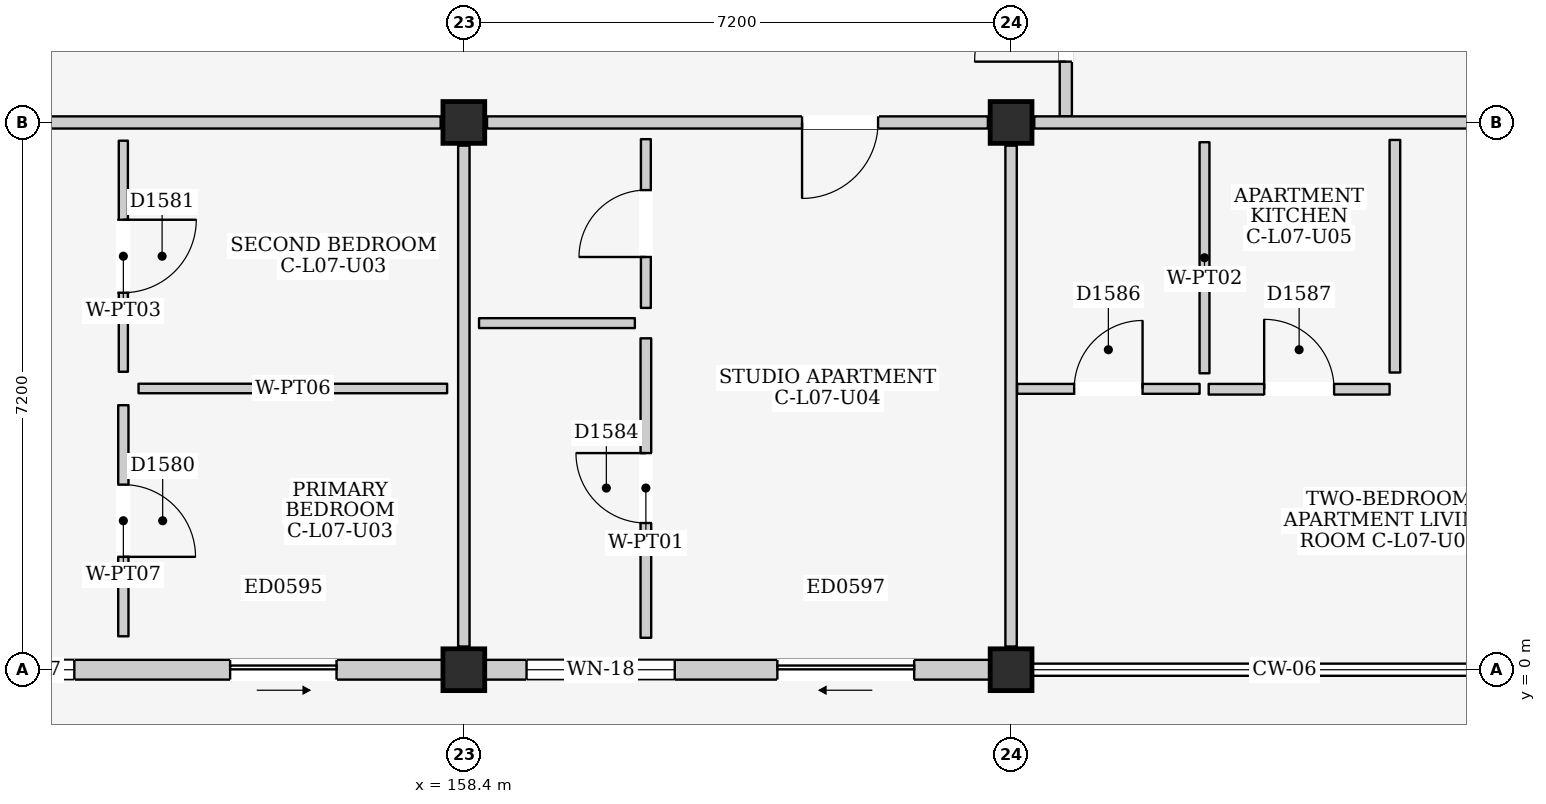
"""IFC4 building model, lengths in metres.
Left out: names, types, materials, properties, quantities, classifications, styles, units other than length and angle.
Written with IfcOpenShell. Run it as: python <this file> out.ifc"""

import sys

from ifc_helpers import new_model, si_unit, direction, frame, frame_2d, origin, origin_2d, place, context, subcontext, project, spatial, rectangle, extrude, element, fill, save


model = new_model("IFC4")
c1 = context("Model", 3, precision=1e-05, world=origin(), true_north=direction((0.0, 1.0)))
c2 = subcontext(c1, "Body", "Model", "MODEL_VIEW")
j1 = project(units=[si_unit("LENGTHUNIT", "METRE"), si_unit("PLANEANGLEUNIT", "RADIAN")], contexts=[c1])
p1 = place(None, origin())
s1 = spatial("IfcSite", under=j1, at=p1, CompositionType="ELEMENT")
p2 = place(p1, origin())
s2 = spatial("IfcBuilding", under=s1, at=p2, CompositionType="ELEMENT")
p3 = place(p2, frame((0.0, 0.0, 25.1)))
s3 = spatial("IfcBuildingStorey", under=s2, at=p3, CompositionType="ELEMENT", Elevation=25.1)
for number, where, z_axis, x_axis in (
    (1, (158.4, 0.0, 0.0), (0.0, 0.0, 1.0), (1.0, 0.0, 0.0)),
    (2, (158.4, 7.2, 0.0), (0.0, 0.0, 1.0), (1.0, 0.0, 0.0)),
    (3, (165.6, 0.0, 0.0), (0.0, 0.0, 1.0), (1.0, 0.0, 0.0)),
    (4, (165.6, 7.2, 0.0), (0.0, 0.0, 1.0), (1.0, 0.0, 0.0)),
):
    element("IfcColumn", number, at=place(p3, frame(where, z_axis=z_axis, x_axis=x_axis)), inside=s3, PredefinedType="COLUMN", context=c2, shape_type="SweptSolid", body=[
        extrude(rectangle(XDim=0.55, YDim=0.55, at=origin_2d()), origin(), (0.0, 0.0, 1.0), 3.2),
    ])
p4 = place(p3, frame((151.475, 0.0, 0.0), z_axis=(0.0, 0.0, 1.0), x_axis=(1.0, 0.0, 0.0)))
e5 = element("IfcWall", 5, at=p4, inside=s3, PredefinedType="ELEMENTEDWALL", context=c2, shape_type="SweptSolid", body=[
    extrude(rectangle(XDim=6.65, YDim=0.26, at=frame_2d((3.325, 0.0))), origin(), (0.0, 0.0, 1.0), 2.525),
])
p5 = place(p4, frame((3.85, 0.0, 0.0)))
e6 = element("IfcOpeningElement", 6, at=p5, cuts=e5, PredefinedType="OPENING", context=c2, shape_type="SweptSolid", body=[
    extrude(rectangle(XDim=1.4, YDim=2.1, at=frame_2d((0.7, 1.05))), frame((0.0, 0.145, 0.0), z_axis=(0.0, -1.0, 0.0), x_axis=(1.0, 0.0, 0.0)), (0.0, 0.0, 1.0), 0.29),
])
p6 = place(p4, frame((0.55, 0.0, 0.9)))
e7 = element("IfcOpeningElement", 7, at=p6, cuts=e5, PredefinedType="OPENING", context=c2, shape_type="SweptSolid", body=[
    extrude(rectangle(XDim=1.25, YDim=1.3, at=frame_2d((0.625, 0.65))), frame((0.0, 0.145, 0.0), z_axis=(0.0, -1.0, 0.0), x_axis=(1.0, 0.0, 0.0)), (0.0, 0.0, 1.0), 0.29),
])
p7 = place(p3, frame((158.675, 0.0, 0.0), z_axis=(0.0, 0.0, 1.0), x_axis=(1.0, 0.0, 0.0)))
e8 = element("IfcWall", 8, at=p7, inside=s3, PredefinedType="ELEMENTEDWALL", context=c2, shape_type="SweptSolid", body=[
    extrude(rectangle(XDim=6.65, YDim=0.26, at=frame_2d((3.325, 0.0))), origin(), (0.0, 0.0, 1.0), 2.525),
])
p8 = place(p7, frame((3.85, 0.0, 0.0)))
e9 = element("IfcOpeningElement", 9, at=p8, cuts=e8, PredefinedType="OPENING", context=c2, shape_type="SweptSolid", body=[
    extrude(rectangle(XDim=1.8, YDim=2.12, at=frame_2d((0.9, 1.06))), frame((0.0, 0.145, 0.0), z_axis=(0.0, -1.0, 0.0), x_axis=(1.0, 0.0, 0.0)), (0.0, 0.0, 1.0), 0.29),
])
p9 = place(p7, frame((0.55, 0.0, 0.865)))
e10 = element("IfcOpeningElement", 10, at=p9, cuts=e8, PredefinedType="OPENING", context=c2, shape_type="SweptSolid", body=[
    extrude(rectangle(XDim=1.95, YDim=1.55, at=frame_2d((0.975, 0.775))), frame((0.0, 0.145, 0.0), z_axis=(0.0, -1.0, 0.0), x_axis=(1.0, 0.0, 0.0)), (0.0, 0.0, 1.0), 0.29),
])
p10 = place(p3, frame((166.32, 7.28, 0.0), z_axis=(0.0, 0.0, 1.0), x_axis=(0.0, 1.0, 0.0)))
e11 = element("IfcWall", 11, at=p10, inside=s3, PredefinedType="PARTITIONING", context=c2, shape_type="SweptSolid", body=[
    extrude(rectangle(XDim=4.32, YDim=0.16, at=frame_2d((2.16, 0.0))), origin(), (0.0, 0.0, 1.0), 2.99),
])
p11 = place(p10, frame((0.72, 0.0, 0.0)))
e12 = element("IfcOpeningElement", 12, at=p11, cuts=e11, PredefinedType="OPENING", context=c2, shape_type="SweptSolid", body=[
    extrude(rectangle(XDim=1.2, YDim=2.2, at=frame_2d((0.6, 1.1))), frame((0.0, 0.095, 0.0), z_axis=(0.0, -1.0, 0.0), x_axis=(1.0, 0.0, 0.0)), (0.0, 0.0, 1.0), 0.19),
])
p12 = place(p3, frame((151.505, 7.2, 0.0), z_axis=(0.0, 0.0, 1.0), x_axis=(1.0, 0.0, 0.0)))
e13 = element("IfcWall", 13, at=p12, inside=s3, PredefinedType="PARTITIONING", context=c2, shape_type="SweptSolid", body=[
    extrude(rectangle(XDim=6.59, YDim=0.16, at=frame_2d((3.295, 0.0))), origin(), (0.0, 0.0, 1.0), 2.375),
])
p13 = place(p12, frame((0.18, 0.0, 0.0)))
e14 = element("IfcOpeningElement", 14, at=p13, cuts=e13, PredefinedType="OPENING", context=c2, shape_type="SweptSolid", body=[
    extrude(rectangle(XDim=1.0, YDim=2.15, at=frame_2d((0.5, 1.075))), frame((0.0, 0.095, 0.0), z_axis=(0.0, -1.0, 0.0), x_axis=(1.0, 0.0, 0.0)), (0.0, 0.0, 1.0), 0.19),
])
p14 = place(p3, frame((158.4, 0.305, 0.0), z_axis=(0.0, 0.0, 1.0), x_axis=(0.0, 1.0, 0.0)))
e15 = element("IfcWall", 15, at=p14, inside=s3, PredefinedType="PARTITIONING", context=c2, shape_type="SweptSolid", body=[
    extrude(rectangle(XDim=6.59, YDim=0.15, at=frame_2d((3.295, 0.0))), origin(), (0.0, 0.0, 1.0), 2.475),
])
p15 = place(p3, frame((153.92, 0.44, 0.0), z_axis=(0.0, 0.0, 1.0), x_axis=(0.0, 1.0, 0.0)))
e16 = element("IfcWall", 16, at=p15, inside=s3, PredefinedType="PARTITIONING", context=c2, shape_type="SweptSolid", body=[
    extrude(rectangle(XDim=3.04, YDim=0.135, at=frame_2d((1.52, 0.0))), origin(), (0.0, 0.0, 1.0), 2.99),
])
p16 = place(p15, frame((1.045, 0.0, 0.0)))
e17 = element("IfcOpeningElement", 17, at=p16, cuts=e16, PredefinedType="OPENING", context=c2, shape_type="SweptSolid", body=[
    extrude(rectangle(XDim=0.95, YDim=2.15, at=frame_2d((0.475, 1.075))), frame((0.0, 0.083, 0.0), z_axis=(0.0, -1.0, 0.0), x_axis=(1.0, 0.0, 0.0)), (0.0, 0.0, 1.0), 0.165),
])
p17 = place(p3, frame((154.12, 3.7, 0.0), z_axis=(0.0, 0.0, 1.0), x_axis=(1.0, 0.0, 0.0)))
e18 = element("IfcWall", 18, at=p17, inside=s3, PredefinedType="PARTITIONING", context=c2, shape_type="SweptSolid", body=[
    extrude(rectangle(XDim=4.06, YDim=0.125, at=frame_2d((2.03, 0.0))), origin(), (0.0, 0.0, 1.0), 2.99),
])
p18 = place(p3, frame((153.92, 3.92, 0.0), z_axis=(0.0, 0.0, 1.0), x_axis=(0.0, 1.0, 0.0)))
e19 = element("IfcWall", 19, at=p18, inside=s3, PredefinedType="PARTITIONING", context=c2, shape_type="SweptSolid", body=[
    extrude(rectangle(XDim=3.04, YDim=0.12, at=frame_2d((1.52, 0.0))), origin(), (0.0, 0.0, 1.0), 2.99),
])
p19 = place(p18, frame((1.04, 0.0, 0.0)))
e20 = element("IfcOpeningElement", 20, at=p19, cuts=e19, PredefinedType="OPENING", context=c2, shape_type="SweptSolid", body=[
    extrude(rectangle(XDim=0.96, YDim=2.15, at=frame_2d((0.48, 1.075))), frame((0.0, 0.075, 0.0), z_axis=(0.0, -1.0, 0.0), x_axis=(1.0, 0.0, 0.0)), (0.0, 0.0, 1.0), 0.15),
])
p20 = place(p3, frame((158.705, 7.2, 0.0), z_axis=(0.0, 0.0, 1.0), x_axis=(1.0, 0.0, 0.0)))
e21 = element("IfcWall", 21, at=p20, inside=s3, PredefinedType="PARTITIONING", context=c2, shape_type="SweptSolid", body=[
    extrude(rectangle(XDim=6.59, YDim=0.16, at=frame_2d((3.295, 0.0))), origin(), (0.0, 0.0, 1.0), 2.375),
])
p21 = place(p20, frame((4.145, 0.0, 0.0)))
e22 = element("IfcOpeningElement", 22, at=p21, cuts=e21, PredefinedType="OPENING", context=c2, shape_type="SweptSolid", body=[
    extrude(rectangle(XDim=1.0, YDim=2.15, at=frame_2d((0.5, 1.075))), frame((0.0, 0.095, 0.0), z_axis=(0.0, -1.0, 0.0), x_axis=(1.0, 0.0, 0.0)), (0.0, 0.0, 1.0), 0.19),
])
p22 = place(p3, frame((165.6, 0.305, 0.0), z_axis=(0.0, 0.0, 1.0), x_axis=(0.0, 1.0, 0.0)))
e23 = element("IfcWall", 23, at=p22, inside=s3, PredefinedType="PARTITIONING", context=c2, shape_type="SweptSolid", body=[
    extrude(rectangle(XDim=6.59, YDim=0.15, at=frame_2d((3.295, 0.0))), origin(), (0.0, 0.0, 1.0), 2.475),
])
p23 = place(p3, frame((158.6, 4.56, 0.0), z_axis=(0.0, 0.0, 1.0), x_axis=(1.0, 0.0, 0.0)))
e24 = element("IfcWall", 24, at=p23, inside=s3, PredefinedType="PARTITIONING", context=c2, shape_type="SweptSolid", body=[
    extrude(rectangle(XDim=2.05, YDim=0.13, at=frame_2d((1.025, 0.0))), origin(), (0.0, 0.0, 1.0), 2.99),
])
p24 = place(p3, frame((160.795, 4.76, 0.0), z_axis=(0.0, 0.0, 1.0), x_axis=(0.0, 1.0, 0.0)))
e25 = element("IfcWall", 25, at=p24, inside=s3, PredefinedType="PARTITIONING", context=c2, shape_type="SweptSolid", body=[
    extrude(rectangle(XDim=2.22, YDim=0.13, at=frame_2d((1.11, 0.0))), origin(), (0.0, 0.0, 1.0), 2.99),
])
p25 = place(p24, frame((0.67, 0.0, 0.0)))
e26 = element("IfcOpeningElement", 26, at=p25, cuts=e25, PredefinedType="OPENING", context=c2, shape_type="SweptSolid", body=[
    extrude(rectangle(XDim=0.88, YDim=2.1, at=frame_2d((0.44, 1.05))), frame((0.0, 0.08, 0.0), z_axis=(0.0, -1.0, 0.0), x_axis=(1.0, 0.0, 0.0)), (0.0, 0.0, 1.0), 0.16),
])
p26 = place(p3, frame((160.795, 0.42, 0.0), z_axis=(0.0, 0.0, 1.0), x_axis=(0.0, 1.0, 0.0)))
e27 = element("IfcWall", 27, at=p26, inside=s3, PredefinedType="PARTITIONING", context=c2, shape_type="SweptSolid", body=[
    extrude(rectangle(XDim=3.94, YDim=0.14, at=frame_2d((1.97, 0.0))), origin(), (0.0, 0.0, 1.0), 2.99),
])
p27 = place(p26, frame((1.51, 0.0, 0.0)))
e28 = element("IfcOpeningElement", 28, at=p27, cuts=e27, PredefinedType="OPENING", context=c2, shape_type="SweptSolid", body=[
    extrude(rectangle(XDim=0.92, YDim=2.1, at=frame_2d((0.46, 1.05))), frame((0.0, 0.085, 0.0), z_axis=(0.0, -1.0, 0.0), x_axis=(1.0, 0.0, 0.0)), (0.0, 0.0, 1.0), 0.17),
])
p28 = place(p3, frame((165.905, 7.2, 0.0), z_axis=(0.0, 0.0, 1.0), x_axis=(1.0, 0.0, 0.0)))
e29 = element("IfcWall", 29, at=p28, inside=s3, PredefinedType="PARTITIONING", context=c2, shape_type="SweptSolid", body=[
    extrude(rectangle(XDim=6.59, YDim=0.16, at=frame_2d((3.295, 0.0))), origin(), (0.0, 0.0, 1.0), 2.375),
])
p29 = place(p3, frame((165.68, 3.695, 0.0), z_axis=(0.0, 0.0, 1.0), x_axis=(1.0, 0.0, 0.0)))
e30 = element("IfcWall", 30, at=p29, inside=s3, PredefinedType="PARTITIONING", context=c2, shape_type="SweptSolid", body=[
    extrude(rectangle(XDim=2.4, YDim=0.13, at=frame_2d((1.2, 0.0))), origin(), (0.0, 0.0, 1.0), 2.99),
])
p30 = place(p29, frame((0.75, 0.0, 0.0)))
e31 = element("IfcOpeningElement", 31, at=p30, cuts=e30, PredefinedType="OPENING", context=c2, shape_type="SweptSolid", body=[
    extrude(rectangle(XDim=0.9, YDim=2.1, at=frame_2d((0.45, 1.05))), frame((0.0, 0.08, 0.0), z_axis=(0.0, -1.0, 0.0), x_axis=(1.0, 0.0, 0.0)), (0.0, 0.0, 1.0), 0.16),
])
p31 = place(p3, frame((168.145, 3.9, 0.0), z_axis=(0.0, 0.0, 1.0), x_axis=(0.0, 1.0, 0.0)))
e32 = element("IfcWall", 32, at=p31, inside=s3, PredefinedType="PARTITIONING", context=c2, shape_type="SweptSolid", body=[
    extrude(rectangle(XDim=3.04, YDim=0.13, at=frame_2d((1.52, 0.0))), origin(), (0.0, 0.0, 1.0), 2.99),
])
p32 = place(p3, frame((168.2, 3.69, 0.0), z_axis=(0.0, 0.0, 1.0), x_axis=(1.0, 0.0, 0.0)))
e33 = element("IfcWall", 33, at=p32, inside=s3, PredefinedType="PARTITIONING", context=c2, shape_type="SweptSolid", body=[
    extrude(rectangle(XDim=2.38, YDim=0.14, at=frame_2d((1.19, 0.0))), origin(), (0.0, 0.0, 1.0), 2.99),
])
p33 = place(p32, frame((0.73, 0.0, 0.0)))
e34 = element("IfcOpeningElement", 34, at=p33, cuts=e33, PredefinedType="OPENING", context=c2, shape_type="SweptSolid", body=[
    extrude(rectangle(XDim=0.92, YDim=2.1, at=frame_2d((0.46, 1.05))), frame((0.0, 0.085, 0.0), z_axis=(0.0, -1.0, 0.0), x_axis=(1.0, 0.0, 0.0)), (0.0, 0.0, 1.0), 0.17),
])
p34 = place(p3, frame((170.65, 3.91, 0.0), z_axis=(0.0, 0.0, 1.0), x_axis=(0.0, 1.0, 0.0)))
e35 = element("IfcWall", 35, at=p34, inside=s3, PredefinedType="PARTITIONING", context=c2, shape_type="SweptSolid", body=[
    extrude(rectangle(XDim=3.06, YDim=0.14, at=frame_2d((1.53, 0.0))), origin(), (0.0, 0.0, 1.0), 2.99),
])
p35 = place(p5, frame((1.4, 0.0, 0.0), z_axis=(0.0, 0.0, 1.0), x_axis=(-1.0, 0.0, 0.0)))
e36 = element("IfcDoor", 36, at=p35, inside=s3, OperationType="SLIDING_TO_RIGHT", PredefinedType="DOOR", context=c2, shape_type="SweptSolid", body=[
    extrude(rectangle(XDim=1.4, YDim=2.1, at=frame_2d((0.7, 1.05))), frame((0.0, 0.025, 0.0), z_axis=(0.0, -1.0, 0.0), x_axis=(1.0, 0.0, 0.0)), (0.0, 0.0, 1.0), 0.05),
])
fill(e6, e36)
p36 = place(p6, origin())
e37 = element("IfcWindow", 37, at=p36, inside=s3, PartitioningType="SINGLE_PANEL", PredefinedType="WINDOW", context=c2, shape_type="SweptSolid", body=[
    extrude(rectangle(XDim=1.25, YDim=1.3, at=frame_2d((0.625, 0.65))), frame((0.0, 0.03, 0.0), z_axis=(0.0, -1.0, 0.0), x_axis=(1.0, 0.0, 0.0)), (0.0, 0.0, 1.0), 0.06),
])
fill(e7, e37)
p37 = place(p8, frame((1.8, 0.0, 0.0), z_axis=(0.0, 0.0, 1.0), x_axis=(-1.0, 0.0, 0.0)))
e38 = element("IfcDoor", 38, at=p37, inside=s3, OperationType="SLIDING_TO_LEFT", PredefinedType="DOOR", context=c2, shape_type="SweptSolid", body=[
    extrude(rectangle(XDim=1.8, YDim=2.12, at=frame_2d((0.9, 1.06))), frame((0.0, 0.025, 0.0), z_axis=(0.0, -1.0, 0.0), x_axis=(1.0, 0.0, 0.0)), (0.0, 0.0, 1.0), 0.05),
])
fill(e9, e38)
p38 = place(p9, origin())
e39 = element("IfcWindow", 39, at=p38, inside=s3, PartitioningType="DOUBLE_PANEL_VERTICAL", PredefinedType="WINDOW", context=c2, shape_type="SweptSolid", body=[
    extrude(rectangle(XDim=1.95, YDim=1.55, at=frame_2d((0.975, 0.775))), frame((0.0, 0.03, 0.0), z_axis=(0.0, -1.0, 0.0), x_axis=(1.0, 0.0, 0.0)), (0.0, 0.0, 1.0), 0.06),
])
fill(e10, e39)
p39 = place(p11, origin())
e40 = element("IfcDoor", 40, at=p39, inside=s3, OperationType="SINGLE_SWING_LEFT", PredefinedType="DOOR", context=c2, shape_type="SweptSolid", body=[
    extrude(rectangle(XDim=1.2, YDim=2.2, at=frame_2d((0.6, 1.1))), frame((0.0, 0.025, 0.0), z_axis=(0.0, -1.0, 0.0), x_axis=(1.0, 0.0, 0.0)), (0.0, 0.0, 1.0), 0.05),
])
fill(e12, e40)
p40 = place(p16, frame((0.95, 0.0, 0.0), z_axis=(0.0, 0.0, 1.0), x_axis=(-1.0, 0.0, 0.0)))
e41 = element("IfcDoor", 41, at=p40, inside=s3, OperationType="SINGLE_SWING_RIGHT", PredefinedType="DOOR", context=c2, shape_type="SweptSolid", body=[
    extrude(rectangle(XDim=0.95, YDim=2.15, at=frame_2d((0.475, 1.075))), frame((0.0, 0.025, 0.0), z_axis=(0.0, -1.0, 0.0), x_axis=(1.0, 0.0, 0.0)), (0.0, 0.0, 1.0), 0.05),
])
fill(e17, e41)
p41 = place(p19, frame((0.96, 0.0, 0.0), z_axis=(0.0, 0.0, 1.0), x_axis=(-1.0, 0.0, 0.0)))
e42 = element("IfcDoor", 42, at=p41, inside=s3, OperationType="SINGLE_SWING_LEFT", PredefinedType="DOOR", context=c2, shape_type="SweptSolid", body=[
    extrude(rectangle(XDim=0.96, YDim=2.15, at=frame_2d((0.48, 1.075))), frame((0.0, 0.025, 0.0), z_axis=(0.0, -1.0, 0.0), x_axis=(1.0, 0.0, 0.0)), (0.0, 0.0, 1.0), 0.05),
])
fill(e20, e42)
p42 = place(p21, frame((1.0, 0.0, 0.0), z_axis=(0.0, 0.0, 1.0), x_axis=(-1.0, 0.0, 0.0)))
e43 = element("IfcDoor", 43, at=p42, inside=s3, OperationType="SINGLE_SWING_RIGHT", PredefinedType="DOOR", context=c2, shape_type="SweptSolid", body=[
    extrude(rectangle(XDim=1.0, YDim=2.15, at=frame_2d((0.5, 1.075))), frame((0.0, 0.025, 0.0), z_axis=(0.0, -1.0, 0.0), x_axis=(1.0, 0.0, 0.0)), (0.0, 0.0, 1.0), 0.05),
])
fill(e22, e43)
p43 = place(p25, origin())
e44 = element("IfcDoor", 44, at=p43, inside=s3, OperationType="SINGLE_SWING_LEFT", PredefinedType="DOOR", context=c2, shape_type="SweptSolid", body=[
    extrude(rectangle(XDim=0.88, YDim=2.1, at=frame_2d((0.44, 1.05))), frame((0.0, 0.025, 0.0), z_axis=(0.0, -1.0, 0.0), x_axis=(1.0, 0.0, 0.0)), (0.0, 0.0, 1.0), 0.05),
])
fill(e26, e44)
p44 = place(p27, origin())
e45 = element("IfcDoor", 45, at=p44, inside=s3, OperationType="SINGLE_SWING_RIGHT", PredefinedType="DOOR", context=c2, shape_type="SweptSolid", body=[
    extrude(rectangle(XDim=0.92, YDim=2.1, at=frame_2d((0.46, 1.05))), frame((0.0, 0.025, 0.0), z_axis=(0.0, -1.0, 0.0), x_axis=(1.0, 0.0, 0.0)), (0.0, 0.0, 1.0), 0.05),
])
fill(e28, e45)
p45 = place(p30, origin())
e46 = element("IfcDoor", 46, at=p45, inside=s3, OperationType="SINGLE_SWING_RIGHT", PredefinedType="DOOR", context=c2, shape_type="SweptSolid", body=[
    extrude(rectangle(XDim=0.9, YDim=2.1, at=frame_2d((0.45, 1.05))), frame((0.0, 0.025, 0.0), z_axis=(0.0, -1.0, 0.0), x_axis=(1.0, 0.0, 0.0)), (0.0, 0.0, 1.0), 0.05),
])
fill(e31, e46)
p46 = place(p33, origin())
e47 = element("IfcDoor", 47, at=p46, inside=s3, OperationType="SINGLE_SWING_LEFT", PredefinedType="DOOR", context=c2, shape_type="SweptSolid", body=[
    extrude(rectangle(XDim=0.92, YDim=2.1, at=frame_2d((0.46, 1.05))), frame((0.0, 0.025, 0.0), z_axis=(0.0, -1.0, 0.0), x_axis=(1.0, 0.0, 0.0)), (0.0, 0.0, 1.0), 0.05),
])
fill(e34, e47)
save(model, sys.argv[1])
